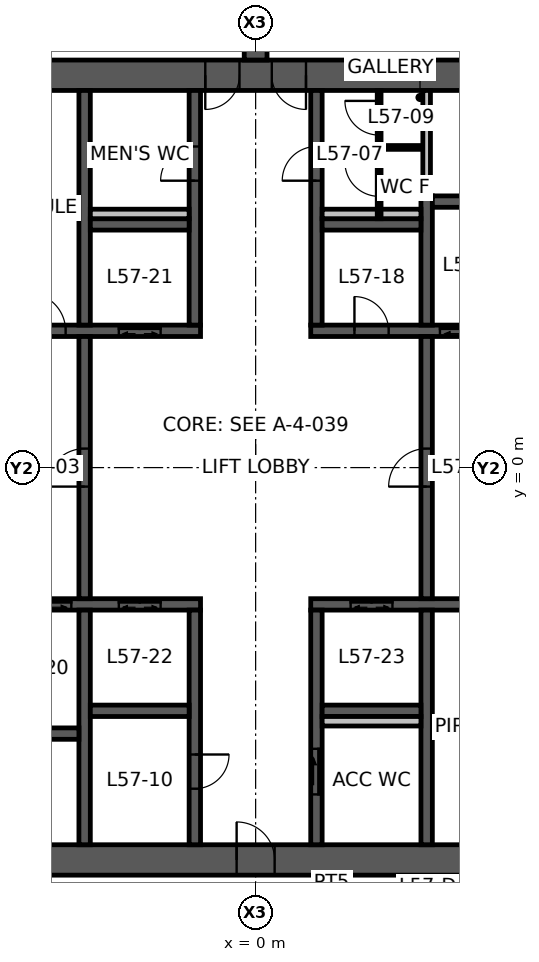
"""IFC4 building model, lengths in metres.
Left out: names, types, materials, properties, quantities, classifications, styles, units other than length and angle.
Written with IfcOpenShell. Run it as: python <this file> out.ifc"""

import sys

from ifc_helpers import new_model, si_unit, direction, frame, frame_2d, origin, place, context, subcontext, project, spatial, polyline, rectangle, outline, extrude, element, fill, save


model = new_model("IFC4")
c1 = context("Model", 3, precision=1e-05, world=origin(), true_north=direction((0.0, 1.0)))
c2 = subcontext(c1, "Body", "Model", "MODEL_VIEW")
j1 = project(units=[si_unit("LENGTHUNIT", "METRE"), si_unit("PLANEANGLEUNIT", "RADIAN")], contexts=[c1])
p1 = place(None, origin())
s1 = spatial("IfcSite", under=j1, at=p1, CompositionType="ELEMENT")
p2 = place(p1, origin())
s2 = spatial("IfcBuilding", under=s1, at=p2, CompositionType="ELEMENT")
p3 = place(p2, frame((0.0, 0.0, 228.4)))
s3 = spatial("IfcBuildingStorey", under=s2, at=p3, CompositionType="ELEMENT", Elevation=228.4)
p4 = place(p3, frame((5.961, 10.325, 0.0), z_axis=(0.0, 0.0, 1.0), x_axis=(-1.0, 0.0, 0.0)))
e1 = element("IfcWall", 1, at=p4, inside=s3, PredefinedType="SHEAR", context=c2, shape_type="SweptSolid", body=[
    extrude(outline(polyline([(-0.231, -0.4), (4.636, -0.4), (5.536, -0.4), (6.386, -0.4), (7.286, -0.4), (12.153, -0.4), (11.691, 0.4), (7.286, 0.4), (6.386, 0.4), (5.536, 0.4), (4.636, 0.4), (0.231, 0.4), (-0.231, -0.4)])), origin(), (0.0, 0.0, 1.0), 3.9),
])
p5 = place(p4, frame((6.386, 0.0, 0.0)))
e2 = element("IfcOpeningElement", 2, at=p5, cuts=e1, PredefinedType="OPENING", context=c2, shape_type="SweptSolid", body=[
    extrude(rectangle(XDim=0.9, YDim=2.1, at=frame_2d((0.45, 1.05))), frame((0.0, 0.41, 0.0), z_axis=(0.0, -1.0, 0.0), x_axis=(1.0, 0.0, 0.0)), (0.0, 0.0, 1.0), 0.82),
])
p6 = place(p4, frame((4.636, 0.0, 0.0)))
e3 = element("IfcOpeningElement", 3, at=p6, cuts=e1, PredefinedType="OPENING", context=c2, shape_type="SweptSolid", body=[
    extrude(rectangle(XDim=0.9, YDim=2.1, at=frame_2d((0.45, 1.05))), frame((0.0, 0.41, 0.0), z_axis=(0.0, -1.0, 0.0), x_axis=(1.0, 0.0, 0.0)), (0.0, 0.0, 1.0), 0.82),
])
p7 = place(p3, frame((-5.961, -10.325, 0.0), z_axis=(0.0, 0.0, 1.0), x_axis=(1.0, 0.0, 0.0)))
e4 = element("IfcWall", 4, at=p7, inside=s3, PredefinedType="SHEAR", context=c2, shape_type="SweptSolid", body=[
    extrude(outline(polyline([(-0.231, -0.4), (5.461, -0.4), (6.461, -0.4), (12.153, -0.4), (11.691, 0.4), (6.461, 0.4), (5.461, 0.4), (0.231, 0.4), (-0.231, -0.4)])), origin(), (0.0, 0.0, 1.0), 3.9),
])
p8 = place(p7, frame((5.461, 0.0, 0.0)))
e5 = element("IfcOpeningElement", 5, at=p8, cuts=e4, PredefinedType="OPENING", context=c2, shape_type="SweptSolid", body=[
    extrude(rectangle(XDim=1.0, YDim=2.1, at=frame_2d((0.5, 1.05))), frame((0.0, 0.41, 0.0), z_axis=(0.0, -1.0, 0.0), x_axis=(1.0, 0.0, 0.0)), (0.0, 0.0, 1.0), 0.82),
])
p9 = place(p3, frame((0.0, 10.725, 0.0), z_axis=(0.0, 0.0, 1.0), x_axis=(0.0, 1.0, 0.0)))
e6 = element("IfcWall", 6, at=p9, inside=s3, PredefinedType="SHEAR", context=c2, shape_type="SweptSolid", body=[
    extrude(rectangle(XDim=7.045, YDim=0.6, at=frame_2d((3.523, 0.0))), origin(), (0.0, 0.0, 1.0), 3.9),
])
p10 = place(p9, frame((1.0, 0.0, 0.0)))
e7 = element("IfcOpeningElement", 7, at=p10, cuts=e6, PredefinedType="OPENING", context=c2, shape_type="SweptSolid", body=[
    extrude(rectangle(XDim=1.0, YDim=2.1, at=frame_2d((0.5, 1.05))), frame((0.0, 0.31, 0.0), z_axis=(0.0, -1.0, 0.0), x_axis=(1.0, 0.0, 0.0)), (0.0, 0.0, 1.0), 0.62),
])
p11 = place(p3, frame((-9.382, 3.6, 0.0), z_axis=(0.0, 0.0, 1.0), x_axis=(1.0, 0.0, 0.0)))
e8 = element("IfcWall", 8, at=p11, inside=s3, PredefinedType="SHEAR", context=c2, shape_type="SweptSolid", body=[
    extrude(outline(polyline([(-0.087, -0.15), (3.382, -0.15), (4.382, -0.15), (5.782, -0.15), (6.882, -0.15), (7.932, -0.15), (7.932, 0.15), (6.882, 0.15), (5.782, 0.15), (4.382, 0.15), (3.382, 0.15), (0.087, 0.15), (-0.087, -0.15)])), origin(), (0.0, 0.0, 1.0), 3.9),
])
p12 = place(p11, frame((3.382, 0.0, 0.0)))
e9 = element("IfcOpeningElement", 9, at=p12, cuts=e8, PredefinedType="OPENING", context=c2, shape_type="SweptSolid", body=[
    extrude(rectangle(XDim=1.0, YDim=2.1, at=frame_2d((0.5, 1.05))), frame((0.0, 0.16, 0.0), z_axis=(0.0, -1.0, 0.0), x_axis=(1.0, 0.0, 0.0)), (0.0, 0.0, 1.0), 0.32),
])
p13 = place(p11, frame((5.782, 0.0, 0.0)))
e10 = element("IfcOpeningElement", 10, at=p13, cuts=e8, PredefinedType="OPENING", context=c2, shape_type="SweptSolid", body=[
    extrude(rectangle(XDim=1.1, YDim=2.1, at=frame_2d((0.55, 1.05))), frame((0.0, 0.16, 0.0), z_axis=(0.0, -1.0, 0.0), x_axis=(1.0, 0.0, 0.0)), (0.0, 0.0, 1.0), 0.32),
])
p14 = place(p3, frame((1.45, 3.6, 0.0), z_axis=(0.0, 0.0, 1.0), x_axis=(1.0, 0.0, 0.0)))
e11 = element("IfcWall", 11, at=p14, inside=s3, PredefinedType="SHEAR", context=c2, shape_type="SweptSolid", body=[
    extrude(outline(polyline([(0.0, -0.15), (1.15, -0.15), (2.05, -0.15), (3.4, -0.15), (4.7, -0.15), (8.019, -0.15), (7.845, 0.15), (4.7, 0.15), (3.4, 0.15), (2.05, 0.15), (1.15, 0.15), (0.0, 0.15), (0.0, -0.15)])), origin(), (0.0, 0.0, 1.0), 3.9),
])
p15 = place(p14, frame((1.15, 0.0, 0.0)))
e12 = element("IfcOpeningElement", 12, at=p15, cuts=e11, PredefinedType="OPENING", context=c2, shape_type="SweptSolid", body=[
    extrude(rectangle(XDim=0.9, YDim=2.1, at=frame_2d((0.45, 1.05))), frame((0.0, 0.16, 0.0), z_axis=(0.0, -1.0, 0.0), x_axis=(1.0, 0.0, 0.0)), (0.0, 0.0, 1.0), 0.32),
])
p16 = place(p14, frame((3.4, 0.0, 0.0)))
e13 = element("IfcOpeningElement", 13, at=p16, cuts=e11, PredefinedType="OPENING", context=c2, shape_type="SweptSolid", body=[
    extrude(rectangle(XDim=1.3, YDim=2.1, at=frame_2d((0.65, 1.05))), frame((0.0, 0.16, 0.0), z_axis=(0.0, -1.0, 0.0), x_axis=(1.0, 0.0, 0.0)), (0.0, 0.0, 1.0), 0.32),
])
p17 = place(p3, frame((-9.382, -3.6, 0.0), z_axis=(0.0, 0.0, 1.0), x_axis=(1.0, 0.0, 0.0)))
e14 = element("IfcWall", 14, at=p17, inside=s3, PredefinedType="SHEAR", context=c2, shape_type="SweptSolid", body=[
    extrude(outline(polyline([(0.087, -0.15), (3.232, -0.15), (4.532, -0.15), (5.782, -0.15), (6.882, -0.15), (7.932, -0.15), (7.932, 0.15), (6.882, 0.15), (5.782, 0.15), (4.532, 0.15), (3.232, 0.15), (-0.087, 0.15), (0.087, -0.15)])), origin(), (0.0, 0.0, 1.0), 3.9),
])
p18 = place(p17, frame((5.782, 0.0, 0.0)))
e15 = element("IfcOpeningElement", 15, at=p18, cuts=e14, PredefinedType="OPENING", context=c2, shape_type="SweptSolid", body=[
    extrude(rectangle(XDim=1.1, YDim=2.1, at=frame_2d((0.55, 1.05))), frame((0.0, 0.16, 0.0), z_axis=(0.0, -1.0, 0.0), x_axis=(1.0, 0.0, 0.0)), (0.0, 0.0, 1.0), 0.32),
])
p19 = place(p17, frame((3.232, 0.0, 0.0)))
e16 = element("IfcOpeningElement", 16, at=p19, cuts=e14, PredefinedType="OPENING", context=c2, shape_type="SweptSolid", body=[
    extrude(rectangle(XDim=1.3, YDim=2.1, at=frame_2d((0.65, 1.05))), frame((0.0, 0.16, 0.0), z_axis=(0.0, -1.0, 0.0), x_axis=(1.0, 0.0, 0.0)), (0.0, 0.0, 1.0), 0.32),
])
p20 = place(p3, frame((1.45, -3.6, 0.0), z_axis=(0.0, 0.0, 1.0), x_axis=(1.0, 0.0, 0.0)))
e17 = element("IfcWall", 17, at=p20, inside=s3, PredefinedType="SHEAR", context=c2, shape_type="SweptSolid", body=[
    extrude(outline(polyline([(0.0, -0.15), (1.05, -0.15), (2.15, -0.15), (7.845, -0.15), (8.019, 0.15), (2.15, 0.15), (1.05, 0.15), (0.0, 0.15), (0.0, -0.15)])), origin(), (0.0, 0.0, 1.0), 3.9),
])
p21 = place(p20, frame((1.05, 0.0, 0.0)))
e18 = element("IfcOpeningElement", 18, at=p21, cuts=e17, PredefinedType="OPENING", context=c2, shape_type="SweptSolid", body=[
    extrude(rectangle(XDim=1.1, YDim=2.1, at=frame_2d((0.55, 1.05))), frame((0.0, 0.16, 0.0), z_axis=(0.0, -1.0, 0.0), x_axis=(1.0, 0.0, 0.0)), (0.0, 0.0, 1.0), 0.32),
])
p22 = place(p3, frame((-1.6, 3.75, 0.0), z_axis=(0.0, 0.0, 1.0), x_axis=(0.0, 1.0, 0.0)))
e19 = element("IfcWall", 19, at=p22, inside=s3, PredefinedType="SHEAR", context=c2, shape_type="SweptSolid", body=[
    extrude(rectangle(XDim=6.175, YDim=0.3, at=frame_2d((3.087, 0.0))), origin(), (0.0, 0.0, 1.0), 3.9),
])
p23 = place(p22, frame((3.8, 0.0, 0.0)))
e20 = element("IfcOpeningElement", 20, at=p23, cuts=e19, PredefinedType="OPENING", context=c2, shape_type="SweptSolid", body=[
    extrude(rectangle(XDim=0.9, YDim=2.1, at=frame_2d((0.45, 1.05))), frame((0.0, 0.16, 0.0), z_axis=(0.0, -1.0, 0.0), x_axis=(1.0, 0.0, 0.0)), (0.0, 0.0, 1.0), 0.32),
])
p24 = place(p3, frame((1.6, 3.75, 0.0), z_axis=(0.0, 0.0, 1.0), x_axis=(0.0, 1.0, 0.0)))
e21 = element("IfcWall", 21, at=p24, inside=s3, PredefinedType="SHEAR", context=c2, shape_type="SweptSolid", body=[
    extrude(rectangle(XDim=6.175, YDim=0.3, at=frame_2d((3.087, 0.0))), origin(), (0.0, 0.0, 1.0), 3.9),
])
p25 = place(p24, frame((3.8, 0.0, 0.0)))
e22 = element("IfcOpeningElement", 22, at=p25, cuts=e21, PredefinedType="OPENING", context=c2, shape_type="SweptSolid", body=[
    extrude(rectangle(XDim=0.9, YDim=2.1, at=frame_2d((0.45, 1.05))), frame((0.0, 0.16, 0.0), z_axis=(0.0, -1.0, 0.0), x_axis=(1.0, 0.0, 0.0)), (0.0, 0.0, 1.0), 0.32),
])
p26 = place(p3, frame((-1.6, -3.75, 0.0), z_axis=(0.0, 0.0, 1.0), x_axis=(0.0, -1.0, 0.0)))
e23 = element("IfcWall", 23, at=p26, inside=s3, PredefinedType="SHEAR", context=c2, shape_type="SweptSolid", body=[
    extrude(rectangle(XDim=6.175, YDim=0.3, at=frame_2d((3.087, 0.0))), origin(), (0.0, 0.0, 1.0), 3.9),
])
p27 = place(p26, frame((3.8, 0.0, 0.0)))
e24 = element("IfcOpeningElement", 24, at=p27, cuts=e23, PredefinedType="OPENING", context=c2, shape_type="SweptSolid", body=[
    extrude(rectangle(XDim=0.9, YDim=2.1, at=frame_2d((0.45, 1.05))), frame((0.0, 0.16, 0.0), z_axis=(0.0, -1.0, 0.0), x_axis=(1.0, 0.0, 0.0)), (0.0, 0.0, 1.0), 0.32),
])
p28 = place(p3, frame((1.6, -3.75, 0.0), z_axis=(0.0, 0.0, 1.0), x_axis=(0.0, -1.0, 0.0)))
e25 = element("IfcWall", 25, at=p28, inside=s3, PredefinedType="SHEAR", context=c2, shape_type="SweptSolid", body=[
    extrude(rectangle(XDim=6.175, YDim=0.3, at=frame_2d((3.087, 0.0))), origin(), (0.0, 0.0, 1.0), 3.9),
])
p29 = place(p28, frame((3.65, 0.0, 0.0)))
e26 = element("IfcOpeningElement", 26, at=p29, cuts=e25, PredefinedType="OPENING", context=c2, shape_type="SweptSolid", body=[
    extrude(rectangle(XDim=1.2, YDim=2.1, at=frame_2d((0.6, 1.05))), frame((0.0, 0.16, 0.0), z_axis=(0.0, -1.0, 0.0), x_axis=(1.0, 0.0, 0.0)), (0.0, 0.0, 1.0), 0.32),
])
p30 = place(p3, frame((-4.5, -3.45, 0.0), z_axis=(0.0, 0.0, 1.0), x_axis=(0.0, 1.0, 0.0)))
e27 = element("IfcWall", 27, at=p30, inside=s3, PredefinedType="SHEAR", context=c2, shape_type="SweptSolid", body=[
    extrude(rectangle(XDim=6.9, YDim=0.3, at=frame_2d((3.45, 0.0))), origin(), (0.0, 0.0, 1.0), 3.9),
])
p31 = place(p30, frame((2.95, 0.0, 0.0)))
e28 = element("IfcOpeningElement", 28, at=p31, cuts=e27, PredefinedType="OPENING", context=c2, shape_type="SweptSolid", body=[
    extrude(rectangle(XDim=1.0, YDim=2.1, at=frame_2d((0.5, 1.05))), frame((0.0, 0.16, 0.0), z_axis=(0.0, -1.0, 0.0), x_axis=(1.0, 0.0, 0.0)), (0.0, 0.0, 1.0), 0.32),
])
p32 = place(p3, frame((4.5, -3.45, 0.0), z_axis=(0.0, 0.0, 1.0), x_axis=(0.0, 1.0, 0.0)))
e29 = element("IfcWall", 29, at=p32, inside=s3, PredefinedType="SHEAR", context=c2, shape_type="SweptSolid", body=[
    extrude(rectangle(XDim=6.9, YDim=0.3, at=frame_2d((3.45, 0.0))), origin(), (0.0, 0.0, 1.0), 3.9),
])
p33 = place(p32, frame((2.95, 0.0, 0.0)))
e30 = element("IfcOpeningElement", 30, at=p33, cuts=e29, PredefinedType="OPENING", context=c2, shape_type="SweptSolid", body=[
    extrude(rectangle(XDim=1.0, YDim=2.1, at=frame_2d((0.5, 1.05))), frame((0.0, 0.16, 0.0), z_axis=(0.0, -1.0, 0.0), x_axis=(1.0, 0.0, 0.0)), (0.0, 0.0, 1.0), 0.32),
])
p34 = place(p3, frame((-4.5, 3.75, 0.0), z_axis=(0.0, 0.0, 1.0), x_axis=(0.0, 1.0, 0.0)))
e31 = element("IfcWall", 31, at=p34, inside=s3, PredefinedType="SHEAR", context=c2, shape_type="SweptSolid", body=[
    extrude(rectangle(XDim=6.175, YDim=0.3, at=frame_2d((3.087, 0.0))), origin(), (0.0, 0.0, 1.0), 3.9),
])
p35 = place(p3, frame((4.5, 3.75, 0.0), z_axis=(0.0, 0.0, 1.0), x_axis=(0.0, 1.0, 0.0)))
e32 = element("IfcWall", 32, at=p35, inside=s3, PredefinedType="SHEAR", context=c2, shape_type="SweptSolid", body=[
    extrude(rectangle(XDim=3.4, YDim=0.3, at=frame_2d((1.7, 0.0))), origin(), (0.0, 0.0, 1.0), 3.9),
])
for number, where, z_axis, x_axis in (
    (33, (-4.5, -3.75, 0.0), (0.0, 0.0, 1.0), (0.0, -1.0, 0.0)),
    (34, (4.5, -3.75, 0.0), (0.0, 0.0, 1.0), (0.0, -1.0, 0.0)),
):
    element("IfcWall", number, at=place(p3, frame(where, z_axis=z_axis, x_axis=x_axis)), inside=s3, PredefinedType="SHEAR", context=c2, shape_type="SweptSolid", body=[
        extrude(rectangle(XDim=6.175, YDim=0.3, at=frame_2d((3.087, 0.0))), origin(), (0.0, 0.0, 1.0), 3.9),
    ])
for number, where, z_axis, x_axis in (
    (35, (-4.35, 6.4, 0.0), (0.0, 0.0, 1.0), (1.0, 0.0, 0.0)),
    (36, (1.75, 6.4, 0.0), (0.0, 0.0, 1.0), (1.0, 0.0, 0.0)),
    (37, (-4.35, -6.4, 0.0), (0.0, 0.0, 1.0), (1.0, 0.0, 0.0)),
    (38, (1.75, -6.4, 0.0), (0.0, 0.0, 1.0), (1.0, 0.0, 0.0)),
    (39, (-7.25, -7.0, 0.0), (0.0, 0.0, 1.0), (1.0, 0.0, 0.0)),
    (40, (4.65, 7.0, 0.0), (0.0, 0.0, 1.0), (1.0, 0.0, 0.0)),
):
    element("IfcWall", number, at=place(p3, frame(where, z_axis=z_axis, x_axis=x_axis)), inside=s3, PredefinedType="SHEAR", context=c2, shape_type="SweptSolid", body=[
        extrude(rectangle(XDim=2.6, YDim=0.3, at=frame_2d((1.3, 0.0))), origin(), (0.0, 0.0, 1.0), 3.9),
    ])
p36 = place(p3, frame((4.5, 7.15, 0.0), z_axis=(0.0, 0.0, 1.0), x_axis=(0.0, 1.0, 0.0)))
e41 = element("IfcWall", 41, at=p36, inside=s3, PredefinedType="STANDARD", context=c2, shape_type="SweptSolid", body=[
    extrude(rectangle(XDim=2.775, YDim=0.2, at=frame_2d((1.388, 0.0))), origin(), (0.0, 0.0, 1.0), 3.9),
])
for number, where, z_axis, x_axis in (
    (42, (-4.35, 6.675, 0.0), (0.0, 0.0, 1.0), (1.0, 0.0, 0.0)),
    (43, (1.75, 6.675, 0.0), (0.0, 0.0, 1.0), (1.0, 0.0, 0.0)),
    (44, (1.75, -6.675, 0.0), (0.0, 0.0, 1.0), (1.0, 0.0, 0.0)),
):
    element("IfcWall", number, at=place(p3, frame(where, z_axis=z_axis, x_axis=x_axis)), inside=s3, PredefinedType="PLUMBINGWALL", context=c2, shape_type="SweptSolid", body=[
        extrude(rectangle(XDim=2.6, YDim=0.25, at=frame_2d((1.3, 0.0))), origin(), (0.0, 0.0, 1.0), 3.9),
    ])
p37 = place(p3, frame((3.25, 6.55, 0.0), z_axis=(0.0, 0.0, 1.0), x_axis=(0.0, 1.0, 0.0)))
e45 = element("IfcWall", 45, at=p37, inside=s3, PredefinedType="PARTITIONING", context=c2, shape_type="SweptSolid", body=[
    extrude(rectangle(XDim=3.375, YDim=0.1, at=frame_2d((1.688, 0.0))), origin(), (0.0, 0.0, 1.0), 2.95),
])
p38 = place(p37, frame((0.587, 0.0, 0.0)))
e46 = element("IfcOpeningElement", 46, at=p38, cuts=e45, PredefinedType="OPENING", context=c2, shape_type="SweptSolid", body=[
    extrude(rectangle(XDim=0.9, YDim=2.1, at=frame_2d((0.45, 1.05))), frame((0.0, 0.06, 0.0), z_axis=(0.0, -1.0, 0.0), x_axis=(1.0, 0.0, 0.0)), (0.0, 0.0, 1.0), 0.12),
])
p39 = place(p37, frame((2.2, 0.0, 0.0)))
e47 = element("IfcOpeningElement", 47, at=p39, cuts=e45, PredefinedType="OPENING", context=c2, shape_type="SweptSolid", body=[
    extrude(rectangle(XDim=0.9, YDim=2.1, at=frame_2d((0.45, 1.05))), frame((0.0, 0.06, 0.0), z_axis=(0.0, -1.0, 0.0), x_axis=(1.0, 0.0, 0.0)), (0.0, 0.0, 1.0), 0.12),
])
p40 = place(p3, frame((3.3, 8.425, 0.0), z_axis=(0.0, 0.0, 1.0), x_axis=(1.0, 0.0, 0.0)))
e48 = element("IfcWall", 48, at=p40, inside=s3, PredefinedType="PARTITIONING", context=c2, shape_type="SweptSolid", body=[
    extrude(rectangle(XDim=1.05, YDim=0.1, at=frame_2d((0.525, 0.0))), origin(), (0.0, 0.0, 1.0), 2.95),
])
p41 = place(p3, frame((2.0, -13.325, 0.0), z_axis=(0.0, 0.0, 1.0), x_axis=(0.0, 1.0, 0.0)))
e49 = element("IfcWall", 49, at=p41, inside=s3, PredefinedType="PARTITIONING", context=c2, shape_type="SweptSolid", body=[
    extrude(rectangle(XDim=2.58, YDim=0.1, at=frame_2d((1.29, 0.0))), origin(), (0.0, 0.0, 1.0), 2.95),
])
p42 = place(p5, origin())
e50 = element("IfcDoor", 50, at=p42, inside=s3, OperationType="SINGLE_SWING_RIGHT", PredefinedType="DOOR", context=c2, shape_type="SweptSolid", body=[
    extrude(rectangle(XDim=0.9, YDim=2.1, at=frame_2d((0.45, 1.05))), frame((0.0, 0.025, 0.0), z_axis=(0.0, -1.0, 0.0), x_axis=(1.0, 0.0, 0.0)), (0.0, 0.0, 1.0), 0.05),
])
fill(e2, e50)
p43 = place(p6, origin())
e51 = element("IfcDoor", 51, at=p43, inside=s3, OperationType="SINGLE_SWING_LEFT", PredefinedType="DOOR", context=c2, shape_type="SweptSolid", body=[
    extrude(rectangle(XDim=0.9, YDim=2.1, at=frame_2d((0.45, 1.05))), frame((0.0, 0.025, 0.0), z_axis=(0.0, -1.0, 0.0), x_axis=(1.0, 0.0, 0.0)), (0.0, 0.0, 1.0), 0.05),
])
fill(e3, e51)
p44 = place(p8, origin())
e52 = element("IfcDoor", 52, at=p44, inside=s3, OperationType="SINGLE_SWING_LEFT", PredefinedType="DOOR", context=c2, shape_type="SweptSolid", body=[
    extrude(rectangle(XDim=1.0, YDim=2.1, at=frame_2d((0.5, 1.05))), frame((0.0, 0.025, 0.0), z_axis=(0.0, -1.0, 0.0), x_axis=(1.0, 0.0, 0.0)), (0.0, 0.0, 1.0), 0.05),
])
fill(e5, e52)
p45 = place(p33, origin())
e53 = element("IfcDoor", 53, at=p45, inside=s3, OperationType="SINGLE_SWING_LEFT", PredefinedType="DOOR", context=c2, shape_type="SweptSolid", body=[
    extrude(rectangle(XDim=1.0, YDim=2.1, at=frame_2d((0.5, 1.05))), frame((0.0, 0.025, 0.0), z_axis=(0.0, -1.0, 0.0), x_axis=(1.0, 0.0, 0.0)), (0.0, 0.0, 1.0), 0.05),
])
fill(e30, e53)
p46 = place(p31, origin())
e54 = element("IfcDoor", 54, at=p46, inside=s3, OperationType="SINGLE_SWING_LEFT", PredefinedType="DOOR", context=c2, shape_type="SweptSolid", body=[
    extrude(rectangle(XDim=1.0, YDim=2.1, at=frame_2d((0.5, 1.05))), frame((0.0, 0.025, 0.0), z_axis=(0.0, -1.0, 0.0), x_axis=(1.0, 0.0, 0.0)), (0.0, 0.0, 1.0), 0.05),
])
fill(e28, e54)
p47 = place(p12, origin())
e55 = element("IfcDoor", 55, at=p47, inside=s3, OperationType="SINGLE_SWING_LEFT", PredefinedType="DOOR", context=c2, shape_type="SweptSolid", body=[
    extrude(rectangle(XDim=1.0, YDim=2.1, at=frame_2d((0.5, 1.05))), frame((0.0, 0.025, 0.0), z_axis=(0.0, -1.0, 0.0), x_axis=(1.0, 0.0, 0.0)), (0.0, 0.0, 1.0), 0.05),
])
fill(e9, e55)
p48 = place(p23, origin())
e56 = element("IfcDoor", 56, at=p48, inside=s3, OperationType="SINGLE_SWING_LEFT", PredefinedType="DOOR", context=c2, shape_type="SweptSolid", body=[
    extrude(rectangle(XDim=0.9, YDim=2.1, at=frame_2d((0.45, 1.05))), frame((0.0, 0.025, 0.0), z_axis=(0.0, -1.0, 0.0), x_axis=(1.0, 0.0, 0.0)), (0.0, 0.0, 1.0), 0.05),
])
fill(e20, e56)
p49 = place(p25, origin())
e57 = element("IfcDoor", 57, at=p49, inside=s3, OperationType="SINGLE_SWING_LEFT", PredefinedType="DOOR", context=c2, shape_type="SweptSolid", body=[
    extrude(rectangle(XDim=0.9, YDim=2.1, at=frame_2d((0.45, 1.05))), frame((0.0, 0.025, 0.0), z_axis=(0.0, -1.0, 0.0), x_axis=(1.0, 0.0, 0.0)), (0.0, 0.0, 1.0), 0.05),
])
fill(e22, e57)
p50 = place(p29, origin())
e58 = element("IfcDoor", 58, at=p50, inside=s3, OperationType="SLIDING_TO_LEFT", PredefinedType="DOOR", context=c2, shape_type="SweptSolid", body=[
    extrude(rectangle(XDim=1.2, YDim=2.1, at=frame_2d((0.6, 1.05))), frame((0.0, 0.025, 0.0), z_axis=(0.0, -1.0, 0.0), x_axis=(1.0, 0.0, 0.0)), (0.0, 0.0, 1.0), 0.05),
])
fill(e26, e58)
p51 = place(p27, origin())
e59 = element("IfcDoor", 59, at=p51, inside=s3, OperationType="SINGLE_SWING_LEFT", PredefinedType="DOOR", context=c2, shape_type="SweptSolid", body=[
    extrude(rectangle(XDim=0.9, YDim=2.1, at=frame_2d((0.45, 1.05))), frame((0.0, 0.025, 0.0), z_axis=(0.0, -1.0, 0.0), x_axis=(1.0, 0.0, 0.0)), (0.0, 0.0, 1.0), 0.05),
])
fill(e24, e59)
p52 = place(p15, origin())
e60 = element("IfcDoor", 60, at=p52, inside=s3, OperationType="SINGLE_SWING_LEFT", PredefinedType="DOOR", context=c2, shape_type="SweptSolid", body=[
    extrude(rectangle(XDim=0.9, YDim=2.1, at=frame_2d((0.45, 1.05))), frame((0.0, 0.025, 0.0), z_axis=(0.0, -1.0, 0.0), x_axis=(1.0, 0.0, 0.0)), (0.0, 0.0, 1.0), 0.05),
])
fill(e12, e60)
p53 = place(p38, origin())
e61 = element("IfcDoor", 61, at=p53, inside=s3, OperationType="SINGLE_SWING_RIGHT", PredefinedType="DOOR", context=c2, shape_type="SweptSolid", body=[
    extrude(rectangle(XDim=0.9, YDim=2.1, at=frame_2d((0.45, 1.05))), frame((0.0, 0.025, 0.0), z_axis=(0.0, -1.0, 0.0), x_axis=(1.0, 0.0, 0.0)), (0.0, 0.0, 1.0), 0.05),
])
fill(e46, e61)
p54 = place(p39, origin())
e62 = element("IfcDoor", 62, at=p54, inside=s3, OperationType="SINGLE_SWING_RIGHT", PredefinedType="DOOR", context=c2, shape_type="SweptSolid", body=[
    extrude(rectangle(XDim=0.9, YDim=2.1, at=frame_2d((0.45, 1.05))), frame((0.0, 0.025, 0.0), z_axis=(0.0, -1.0, 0.0), x_axis=(1.0, 0.0, 0.0)), (0.0, 0.0, 1.0), 0.05),
])
fill(e47, e62)
p55 = place(p21, origin())
e63 = element("IfcDoor", 63, at=p55, inside=s3, OperationType="DOUBLE_DOOR_SLIDING", PredefinedType="DOOR", context=c2, shape_type="SweptSolid", body=[
    extrude(rectangle(XDim=1.1, YDim=2.1, at=frame_2d((0.55, 1.05))), frame((0.0, 0.025, 0.0), z_axis=(0.0, -1.0, 0.0), x_axis=(1.0, 0.0, 0.0)), (0.0, 0.0, 1.0), 0.05),
])
fill(e18, e63)
p56 = place(p13, origin())
e64 = element("IfcDoor", 64, at=p56, inside=s3, OperationType="DOUBLE_DOOR_SLIDING", PredefinedType="DOOR", context=c2, shape_type="SweptSolid", body=[
    extrude(rectangle(XDim=1.1, YDim=2.1, at=frame_2d((0.55, 1.05))), frame((0.0, 0.025, 0.0), z_axis=(0.0, -1.0, 0.0), x_axis=(1.0, 0.0, 0.0)), (0.0, 0.0, 1.0), 0.05),
])
fill(e10, e64)
p57 = place(p18, origin())
e65 = element("IfcDoor", 65, at=p57, inside=s3, OperationType="DOUBLE_DOOR_SLIDING", PredefinedType="DOOR", context=c2, shape_type="SweptSolid", body=[
    extrude(rectangle(XDim=1.1, YDim=2.1, at=frame_2d((0.55, 1.05))), frame((0.0, 0.025, 0.0), z_axis=(0.0, -1.0, 0.0), x_axis=(1.0, 0.0, 0.0)), (0.0, 0.0, 1.0), 0.05),
])
fill(e15, e65)
p58 = place(p16, origin())
e66 = element("IfcDoor", 66, at=p58, inside=s3, OperationType="DOUBLE_DOOR_SLIDING", PredefinedType="DOOR", context=c2, shape_type="SweptSolid", body=[
    extrude(rectangle(XDim=1.3, YDim=2.1, at=frame_2d((0.65, 1.05))), frame((0.0, 0.025, 0.0), z_axis=(0.0, -1.0, 0.0), x_axis=(1.0, 0.0, 0.0)), (0.0, 0.0, 1.0), 0.05),
])
fill(e13, e66)
p59 = place(p19, origin())
e67 = element("IfcDoor", 67, at=p59, inside=s3, OperationType="DOUBLE_DOOR_SLIDING", PredefinedType="DOOR", context=c2, shape_type="SweptSolid", body=[
    extrude(rectangle(XDim=1.3, YDim=2.1, at=frame_2d((0.65, 1.05))), frame((0.0, 0.025, 0.0), z_axis=(0.0, -1.0, 0.0), x_axis=(1.0, 0.0, 0.0)), (0.0, 0.0, 1.0), 0.05),
])
fill(e16, e67)
save(model, sys.argv[1])
